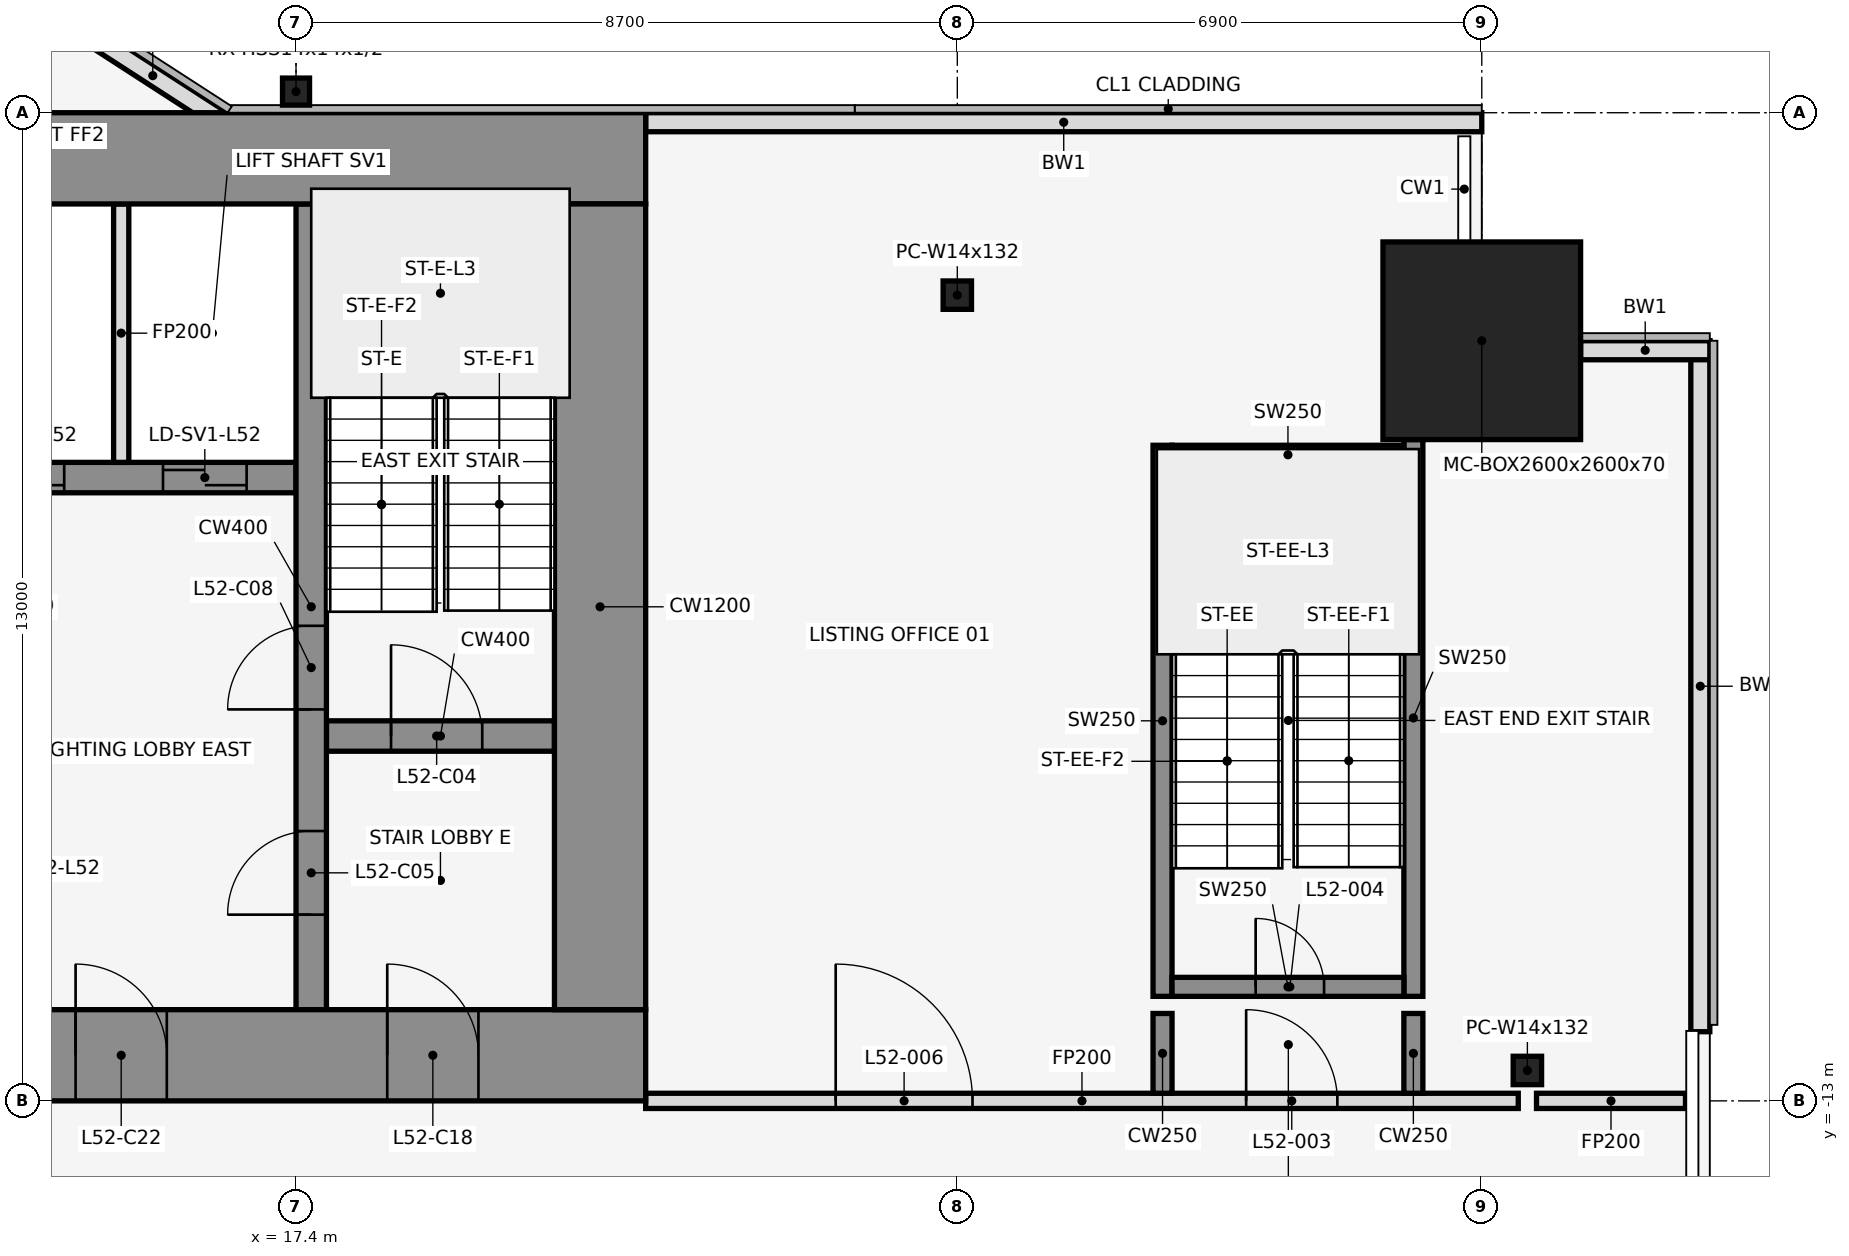
"""IFC4 building model, lengths in metres.
Left out: names, types, materials, properties, quantities, classifications, styles, units other than length and angle.
Written with IfcOpenShell. Run it as: python <this file> out.ifc"""

import sys

from ifc_helpers import new_model, si_unit, direction, frame, frame_2d, origin, origin_2d, place, context, subcontext, project, spatial, rectangle, hollow_rectangle, i_section, extrude, element, fill, save


model = new_model("IFC4")
c1 = context("Model", 3, precision=1e-05, world=origin(), true_north=direction((0.0, 1.0)))
c2 = subcontext(c1, "Body", "Model", "MODEL_VIEW")
j1 = project(units=[si_unit("LENGTHUNIT", "METRE"), si_unit("PLANEANGLEUNIT", "RADIAN")], contexts=[c1])
p1 = place(None, origin())
s1 = spatial("IfcSite", under=j1, at=p1, CompositionType="ELEMENT")
p2 = place(p1, origin())
s2 = spatial("IfcBuilding", under=s1, at=p2, CompositionType="ELEMENT")
p3 = place(p2, frame((0.0, 0.0, 231.9)))
s3 = spatial("IfcBuildingStorey", under=s2, at=p3, CompositionType="ELEMENT", Elevation=231.9)
p4 = place(p3, frame((26.1, -2.4, 0.0), z_axis=(0.0, 0.0, 1.0), x_axis=(1.0, 0.0, 0.0)))
e1 = element("IfcColumn", 1, at=p4, inside=s3, PredefinedType="COLUMN", context=c2, shape_type="SweptSolid", body=[
    extrude(i_section(OverallWidth=0.373, OverallDepth=0.373, WebThickness=0.016, FlangeThickness=0.026, at=origin_2d()), origin(), (0.0, 0.0, 1.0), 4.1),
])
p5 = place(p3, frame((33.0, -3.0, 0.0), z_axis=(0.0, 0.0, 1.0), x_axis=(1.0, 0.0, 0.0)))
e2 = element("IfcColumn", 2, at=p5, inside=s3, PredefinedType="COLUMN", context=c2, shape_type="SweptSolid", body=[
    extrude(hollow_rectangle(XDim=2.6, YDim=2.6, WallThickness=0.07, at=origin_2d()), origin(), (0.0, 0.0, 1.0), 4.1),
])
p6 = place(p3, frame((17.4, 0.278, 0.0), z_axis=(0.0, 0.0, 1.0), x_axis=(1.0, 0.0, 0.0)))
e3 = element("IfcColumn", 3, at=p6, inside=s3, PredefinedType="COLUMN", context=c2, shape_type="SweptSolid", body=[
    extrude(hollow_rectangle(XDim=0.356, YDim=0.356, WallThickness=0.012, at=origin_2d()), origin(), (0.0, 0.0, 1.0), 4.1),
])
p7 = place(p3, frame((33.6, -12.6, 0.0), z_axis=(0.0, 0.0, 1.0), x_axis=(1.0, 0.0, 0.0)))
e4 = element("IfcColumn", 4, at=p7, inside=s3, PredefinedType="COLUMN", context=c2, shape_type="SweptSolid", body=[
    extrude(i_section(OverallWidth=0.373, OverallDepth=0.373, WebThickness=0.016, FlangeThickness=0.026, at=origin_2d()), origin(), (0.0, 0.0, 1.0), 4.1),
])
p8 = place(p3, frame((33.0, -0.125, 0.0), z_axis=(0.0, 0.0, 1.0), x_axis=(-1.0, 0.0, 0.0)))
e5 = element("IfcWall", 5, at=p8, inside=s3, PredefinedType="STANDARD", context=c2, shape_type="SweptSolid", body=[
    extrude(rectangle(XDim=11.0, YDim=0.25, at=frame_2d((5.5, 0.0))), origin(), (0.0, 0.0, 1.0), 3.9),
])
p9 = place(p3, frame((16.432, -0.105, 0.0), z_axis=(0.0, 0.0, 1.0), x_axis=(-0.83981312244, 0.542875602121, 0.0)))
e6 = element("IfcWall", 6, at=p9, inside=s3, PredefinedType="STANDARD", context=c2, shape_type="SweptSolid", body=[
    extrude(rectangle(XDim=2.183, YDim=0.25, at=frame_2d((1.091, 0.0))), origin(), (0.0, 0.0, 1.0), 3.9),
])
p10 = place(p3, frame((35.875, -12.09, 0.0), z_axis=(0.0, 0.0, 1.0), x_axis=(0.0, 1.0, 0.0)))
e7 = element("IfcWall", 7, at=p10, inside=s3, PredefinedType="STANDARD", context=c2, shape_type="SweptSolid", body=[
    extrude(rectangle(XDim=9.09, YDim=0.25, at=frame_2d((4.545, 0.0))), origin(), (0.0, 0.0, 1.0), 3.9),
])
p11 = place(p3, frame((36.0, -3.125, 0.0), z_axis=(0.0, 0.0, 1.0), x_axis=(-1.0, 0.0, 0.0)))
e8 = element("IfcWall", 8, at=p11, inside=s3, PredefinedType="STANDARD", context=c2, shape_type="SweptSolid", body=[
    extrude(rectangle(XDim=1.7, YDim=0.25, at=frame_2d((0.85, 0.0))), origin(), (0.0, 0.0, 1.0), 3.9),
])
p12 = place(p3, frame((28.8, -11.625, 0.0), z_axis=(0.0, 0.0, 1.0), x_axis=(0.0, 1.0, 0.0)))
e9 = element("IfcWall", 9, at=p12, inside=s3, PredefinedType="SHEAR", context=c2, shape_type="SweptSolid", body=[
    extrude(rectangle(XDim=7.25, YDim=0.25, at=frame_2d((3.625, 0.0))), origin(), (0.0, 0.0, 1.0), 4.1),
])
p13 = place(p3, frame((32.1, -11.625, 0.0), z_axis=(0.0, 0.0, 1.0), x_axis=(0.0, 1.0, 0.0)))
e10 = element("IfcWall", 10, at=p13, inside=s3, PredefinedType="SHEAR", context=c2, shape_type="SweptSolid", body=[
    extrude(rectangle(XDim=7.325, YDim=0.25, at=frame_2d((3.663, 0.0))), origin(), (0.0, 0.0, 1.0), 4.1),
])
p14 = place(p3, frame((28.925, -11.5, 0.0), z_axis=(0.0, 0.0, 1.0), x_axis=(1.0, 0.0, 0.0)))
e11 = element("IfcWall", 11, at=p14, inside=s3, PredefinedType="SHEAR", context=c2, shape_type="SweptSolid", body=[
    extrude(rectangle(XDim=3.05, YDim=0.25, at=frame_2d((1.525, 0.0))), origin(), (0.0, 0.0, 1.0), 4.1),
])
p15 = place(p14, frame((1.1, 0.0, 0.0)))
e12 = element("IfcOpeningElement", 12, at=p15, cuts=e11, PredefinedType="OPENING", context=c2, shape_type="SweptSolid", body=[
    extrude(rectangle(XDim=0.9, YDim=2.1, at=frame_2d((0.45, 1.05))), frame((0.0, 0.137, 0.0), z_axis=(0.0, -1.0, 0.0), x_axis=(1.0, 0.0, 0.0)), (0.0, 0.0, 1.0), 0.274),
])
p16 = place(p3, frame((28.925, -4.5, 0.0), z_axis=(0.0, 0.0, 1.0), x_axis=(1.0, 0.0, 0.0)))
e13 = element("IfcWall", 13, at=p16, inside=s3, PredefinedType="SHEAR", context=c2, shape_type="SweptSolid", body=[
    extrude(rectangle(XDim=3.05, YDim=0.25, at=frame_2d((1.525, 0.0))), origin(), (0.0, 0.0, 1.0), 4.1),
])
p17 = place(p3, frame((22.0, -13.0, 0.0), z_axis=(0.0, 0.0, 1.0), x_axis=(1.0, 0.0, 0.0)))
e14 = element("IfcWall", 14, at=p17, inside=s3, PredefinedType="PARTITIONING", context=c2, shape_type="SweptSolid", body=[
    extrude(rectangle(XDim=11.48, YDim=0.2, at=frame_2d((5.74, 0.0))), origin(), (0.0, 0.0, 1.0), 2.79),
])
p18 = place(p17, frame((7.9, 0.0, 0.0)))
e15 = element("IfcOpeningElement", 15, at=p18, cuts=e14, PredefinedType="OPENING", context=c2, shape_type="SweptSolid", body=[
    extrude(rectangle(XDim=1.2, YDim=2.1, at=frame_2d((0.6, 1.05))), frame((0.0, 0.112, 0.0), z_axis=(0.0, -1.0, 0.0), x_axis=(1.0, 0.0, 0.0)), (0.0, 0.0, 1.0), 0.224),
])
p19 = place(p17, frame((2.5, 0.0, 0.0)))
e16 = element("IfcOpeningElement", 16, at=p19, cuts=e14, PredefinedType="OPENING", context=c2, shape_type="SweptSolid", body=[
    extrude(rectangle(XDim=1.8, YDim=2.1, at=frame_2d((0.9, 1.05))), frame((0.0, 0.112, 0.0), z_axis=(0.0, -1.0, 0.0), x_axis=(1.0, 0.0, 0.0)), (0.0, 0.0, 1.0), 0.224),
])
p20 = place(p3, frame((33.72, -13.0, 0.0), z_axis=(0.0, 0.0, 1.0), x_axis=(1.0, 0.0, 0.0)))
e17 = element("IfcWall", 17, at=p20, inside=s3, PredefinedType="PARTITIONING", context=c2, shape_type="SweptSolid", body=[
    extrude(rectangle(XDim=1.96, YDim=0.2, at=frame_2d((0.98, 0.0))), origin(), (0.0, 0.0, 1.0), 2.79),
])
for number, where, z_axis, x_axis in (
    (18, (28.8, -12.9, 0.0), (0.0, 0.0, 1.0), (0.0, 1.0, 0.0)),
    (19, (32.1, -12.9, 0.0), (0.0, 0.0, 1.0), (0.0, 1.0, 0.0)),
):
    element("IfcWall", number, at=place(p3, frame(where, z_axis=z_axis, x_axis=x_axis)), inside=s3, PredefinedType="SHEAR", context=c2, shape_type="SweptSolid", body=[
        extrude(rectangle(XDim=1.05, YDim=0.25, at=frame_2d((0.525, 0.0))), origin(), (0.0, 0.0, 1.0), 4.1),
    ])
p21 = place(p3, frame((17.8, -8.2, 0.0), z_axis=(0.0, 0.0, 1.0), x_axis=(1.0, 0.0, 0.0)))
e20 = element("IfcWall", 20, at=p21, inside=s3, PredefinedType="SHEAR", context=c2, shape_type="SweptSolid", body=[
    extrude(rectangle(XDim=3.0, YDim=0.4, at=frame_2d((1.5, 0.0))), origin(), (0.0, 0.0, 1.0), 4.1),
])
p22 = place(p21, frame((0.85, 0.0, 0.0)))
e21 = element("IfcOpeningElement", 21, at=p22, cuts=e20, PredefinedType="OPENING", context=c2, shape_type="SweptSolid", body=[
    extrude(rectangle(XDim=1.2, YDim=2.1, at=frame_2d((0.6, 1.05))), frame((0.0, 0.212, 0.0), z_axis=(0.0, -1.0, 0.0), x_axis=(1.0, 0.0, 0.0)), (0.0, 0.0, 1.0), 0.424),
])
p23 = place(p3, frame((3.8, -4.8, 0.0), z_axis=(0.0, 0.0, 1.0), x_axis=(1.0, 0.0, 0.0)))
e22 = element("IfcWall", 22, at=p23, inside=s3, PredefinedType="SHEAR", context=c2, shape_type="SweptSolid", body=[
    extrude(rectangle(XDim=13.6, YDim=0.4, at=frame_2d((6.8, 0.0))), origin(), (0.0, 0.0, 1.0), 4.1),
])
p24 = place(p23, frame((9.45, 0.0, 0.0)))
e23 = element("IfcOpeningElement", 23, at=p24, cuts=e22, PredefinedType="OPENING", context=c2, shape_type="SweptSolid", body=[
    extrude(rectangle(XDim=1.1, YDim=2.1, at=frame_2d((0.55, 1.05))), frame((0.0, 0.212, 0.0), z_axis=(0.0, -1.0, 0.0), x_axis=(1.0, 0.0, 0.0)), (0.0, 0.0, 1.0), 0.424),
])
p25 = place(p23, frame((11.85, 0.0, 0.0)))
e24 = element("IfcOpeningElement", 24, at=p25, cuts=e22, PredefinedType="OPENING", context=c2, shape_type="SweptSolid", body=[
    extrude(rectangle(XDim=1.1, YDim=2.1, at=frame_2d((0.55, 1.05))), frame((0.0, 0.212, 0.0), z_axis=(0.0, -1.0, 0.0), x_axis=(1.0, 0.0, 0.0)), (0.0, 0.0, 1.0), 0.424),
])
p26 = place(p3, frame((15.1, -4.6, 0.0), z_axis=(0.0, 0.0, 1.0), x_axis=(0.0, 1.0, 0.0)))
e25 = element("IfcWall", 25, at=p26, inside=s3, PredefinedType="PARTITIONING", context=c2, shape_type="SweptSolid", body=[
    extrude(rectangle(XDim=3.4, YDim=0.2, at=frame_2d((1.7, 0.0))), origin(), (0.0, 0.0, 1.0), 2.79),
])
p27 = place(p3, frame((17.6, -11.8, 0.0), z_axis=(0.0, 0.0, 1.0), x_axis=(0.0, 1.0, 0.0)))
e26 = element("IfcWall", 26, at=p27, inside=s3, PredefinedType="SHEAR", context=c2, shape_type="SweptSolid", body=[
    extrude(rectangle(XDim=10.6, YDim=0.4, at=frame_2d((5.3, 0.0))), origin(), (0.0, 0.0, 1.0), 4.1),
])
p28 = place(p27, frame((1.25, 0.0, 0.0)))
e27 = element("IfcOpeningElement", 27, at=p28, cuts=e26, PredefinedType="OPENING", context=c2, shape_type="SweptSolid", body=[
    extrude(rectangle(XDim=1.1, YDim=2.1, at=frame_2d((0.55, 1.05))), frame((0.0, 0.212, 0.0), z_axis=(0.0, -1.0, 0.0), x_axis=(1.0, 0.0, 0.0)), (0.0, 0.0, 1.0), 0.424),
])
p29 = place(p27, frame((3.95, 0.0, 0.0)))
e28 = element("IfcOpeningElement", 28, at=p29, cuts=e26, PredefinedType="OPENING", context=c2, shape_type="SweptSolid", body=[
    extrude(rectangle(XDim=1.1, YDim=2.1, at=frame_2d((0.55, 1.05))), frame((0.0, 0.212, 0.0), z_axis=(0.0, -1.0, 0.0), x_axis=(1.0, 0.0, 0.0)), (0.0, 0.0, 1.0), 0.424),
])
p30 = place(p3, frame((-22.0, -0.6, 0.0), z_axis=(0.0, 0.0, 1.0), x_axis=(1.0, 0.0, 0.0)))
e29 = element("IfcWall", 29, at=p30, inside=s3, PredefinedType="SHEAR", context=c2, shape_type="SweptSolid", body=[
    extrude(rectangle(XDim=44.0, YDim=1.2, at=frame_2d((22.0, 0.0))), origin(), (0.0, 0.0, 1.0), 4.1),
])
p31 = place(p30, frame((18.55, 0.0, 0.0)))
e30 = element("IfcOpeningElement", 30, at=p31, cuts=e29, PredefinedType="OPENING", context=c2, shape_type="SweptSolid", body=[
    extrude(rectangle(XDim=0.9, YDim=2.1, at=frame_2d((0.45, 1.05))), frame((0.0, 0.612, 0.0), z_axis=(0.0, -1.0, 0.0), x_axis=(1.0, 0.0, 0.0)), (0.0, 0.0, 1.0), 1.224),
])
p32 = place(p30, frame((24.55, 0.0, 0.0)))
e31 = element("IfcOpeningElement", 31, at=p32, cuts=e29, PredefinedType="OPENING", context=c2, shape_type="SweptSolid", body=[
    extrude(rectangle(XDim=0.9, YDim=2.1, at=frame_2d((0.45, 1.05))), frame((0.0, 0.612, 0.0), z_axis=(0.0, -1.0, 0.0), x_axis=(1.0, 0.0, 0.0)), (0.0, 0.0, 1.0), 1.224),
])
p33 = place(p3, frame((-22.0, -12.4, 0.0), z_axis=(0.0, 0.0, 1.0), x_axis=(1.0, 0.0, 0.0)))
e32 = element("IfcWall", 32, at=p33, inside=s3, PredefinedType="SHEAR", context=c2, shape_type="SweptSolid", body=[
    extrude(rectangle(XDim=44.0, YDim=1.2, at=frame_2d((22.0, 0.0))), origin(), (0.0, 0.0, 1.0), 4.1),
])
p34 = place(p33, frame((2.2, 0.0, 0.0)))
e33 = element("IfcOpeningElement", 33, at=p34, cuts=e32, PredefinedType="OPENING", context=c2, shape_type="SweptSolid", body=[
    extrude(rectangle(XDim=1.2, YDim=2.1, at=frame_2d((0.6, 1.05))), frame((0.0, 0.612, 0.0), z_axis=(0.0, -1.0, 0.0), x_axis=(1.0, 0.0, 0.0)), (0.0, 0.0, 1.0), 1.224),
])
p35 = place(p33, frame((21.4, 0.0, 0.0)))
e34 = element("IfcOpeningElement", 34, at=p35, cuts=e32, PredefinedType="OPENING", context=c2, shape_type="SweptSolid", body=[
    extrude(rectangle(XDim=1.2, YDim=2.1, at=frame_2d((0.6, 1.05))), frame((0.0, 0.612, 0.0), z_axis=(0.0, -1.0, 0.0), x_axis=(1.0, 0.0, 0.0)), (0.0, 0.0, 1.0), 1.224),
])
p36 = place(p33, frame((40.6, 0.0, 0.0)))
e35 = element("IfcOpeningElement", 35, at=p36, cuts=e32, PredefinedType="OPENING", context=c2, shape_type="SweptSolid", body=[
    extrude(rectangle(XDim=1.2, YDim=2.1, at=frame_2d((0.6, 1.05))), frame((0.0, 0.612, 0.0), z_axis=(0.0, -1.0, 0.0), x_axis=(1.0, 0.0, 0.0)), (0.0, 0.0, 1.0), 1.224),
])
p37 = place(p33, frame((16.0, 0.0, 0.0)))
e36 = element("IfcOpeningElement", 36, at=p37, cuts=e32, PredefinedType="OPENING", context=c2, shape_type="SweptSolid", body=[
    extrude(rectangle(XDim=1.8, YDim=2.1, at=frame_2d((0.9, 1.05))), frame((0.0, 0.612, 0.0), z_axis=(0.0, -1.0, 0.0), x_axis=(1.0, 0.0, 0.0)), (0.0, 0.0, 1.0), 1.224),
])
p38 = place(p33, frame((6.3, 0.0, 0.0)))
e37 = element("IfcOpeningElement", 37, at=p38, cuts=e32, PredefinedType="OPENING", context=c2, shape_type="SweptSolid", body=[
    extrude(rectangle(XDim=1.2, YDim=2.1, at=frame_2d((0.6, 1.05))), frame((0.0, 0.612, 0.0), z_axis=(0.0, -1.0, 0.0), x_axis=(1.0, 0.0, 0.0)), (0.0, 0.0, 1.0), 1.224),
])
p39 = place(p33, frame((26.2, 0.0, 0.0)))
e38 = element("IfcOpeningElement", 38, at=p39, cuts=e32, PredefinedType="OPENING", context=c2, shape_type="SweptSolid", body=[
    extrude(rectangle(XDim=1.8, YDim=2.1, at=frame_2d((0.9, 1.05))), frame((0.0, 0.612, 0.0), z_axis=(0.0, -1.0, 0.0), x_axis=(1.0, 0.0, 0.0)), (0.0, 0.0, 1.0), 1.224),
])
p40 = place(p33, frame((36.5, 0.0, 0.0)))
e39 = element("IfcOpeningElement", 39, at=p40, cuts=e32, PredefinedType="OPENING", context=c2, shape_type="SweptSolid", body=[
    extrude(rectangle(XDim=1.2, YDim=2.1, at=frame_2d((0.6, 1.05))), frame((0.0, 0.612, 0.0), z_axis=(0.0, -1.0, 0.0), x_axis=(1.0, 0.0, 0.0)), (0.0, 0.0, 1.0), 1.224),
])
p41 = place(p3, frame((21.4, -11.8, 0.0), z_axis=(0.0, 0.0, 1.0), x_axis=(0.0, 1.0, 0.0)))
e40 = element("IfcWall", 40, at=p41, inside=s3, PredefinedType="SHEAR", context=c2, shape_type="SweptSolid", body=[
    extrude(rectangle(XDim=10.6, YDim=1.2, at=frame_2d((5.3, 0.0))), origin(), (0.0, 0.0, 1.0), 4.1),
])
p42 = place(p18, origin())
e41 = element("IfcDoor", 41, at=p42, inside=s3, OperationType="SINGLE_SWING_RIGHT", PredefinedType="DOOR", context=c2, shape_type="SweptSolid", body=[
    extrude(rectangle(XDim=1.2, YDim=2.1, at=frame_2d((0.6, 1.05))), frame((0.0, 0.025, 0.0), z_axis=(0.0, -1.0, 0.0), x_axis=(1.0, 0.0, 0.0)), (0.0, 0.0, 1.0), 0.05),
])
fill(e15, e41)
p43 = place(p15, origin())
e42 = element("IfcDoor", 42, at=p43, inside=s3, OperationType="SINGLE_SWING_LEFT", PredefinedType="DOOR", context=c2, shape_type="SweptSolid", body=[
    extrude(rectangle(XDim=0.9, YDim=2.1, at=frame_2d((0.45, 1.05))), frame((0.0, 0.025, 0.0), z_axis=(0.0, -1.0, 0.0), x_axis=(1.0, 0.0, 0.0)), (0.0, 0.0, 1.0), 0.05),
])
fill(e12, e42)
p44 = place(p19, origin())
e43 = element("IfcDoor", 43, at=p44, inside=s3, OperationType="SINGLE_SWING_LEFT", PredefinedType="DOOR", context=c2, shape_type="SweptSolid", body=[
    extrude(rectangle(XDim=1.8, YDim=2.1, at=frame_2d((0.9, 1.05))), frame((0.0, 0.025, 0.0), z_axis=(0.0, -1.0, 0.0), x_axis=(1.0, 0.0, 0.0)), (0.0, 0.0, 1.0), 0.05),
])
fill(e16, e43)
p45 = place(p22, origin())
e44 = element("IfcDoor", 44, at=p45, inside=s3, OperationType="SINGLE_SWING_RIGHT", PredefinedType="DOOR", context=c2, shape_type="SweptSolid", body=[
    extrude(rectangle(XDim=1.2, YDim=2.1, at=frame_2d((0.6, 1.05))), frame((0.0, 0.025, 0.0), z_axis=(0.0, -1.0, 0.0), x_axis=(1.0, 0.0, 0.0)), (0.0, 0.0, 1.0), 0.05),
])
fill(e21, e44)
p46 = place(p28, origin())
e45 = element("IfcDoor", 45, at=p46, inside=s3, OperationType="SINGLE_SWING_LEFT", PredefinedType="DOOR", context=c2, shape_type="SweptSolid", body=[
    extrude(rectangle(XDim=1.1, YDim=2.1, at=frame_2d((0.55, 1.05))), frame((0.0, 0.025, 0.0), z_axis=(0.0, -1.0, 0.0), x_axis=(1.0, 0.0, 0.0)), (0.0, 0.0, 1.0), 0.05),
])
fill(e27, e45)
p47 = place(p24, origin())
e46 = element("IfcDoor", 46, at=p47, inside=s3, OperationType="DOUBLE_DOOR_SLIDING", PredefinedType="DOOR", context=c2, shape_type="SweptSolid", body=[
    extrude(rectangle(XDim=1.1, YDim=2.1, at=frame_2d((0.55, 1.05))), frame((0.0, 0.025, 0.0), z_axis=(0.0, -1.0, 0.0), x_axis=(1.0, 0.0, 0.0)), (0.0, 0.0, 1.0), 0.05),
])
fill(e23, e46)
p48 = place(p25, origin())
e47 = element("IfcDoor", 47, at=p48, inside=s3, OperationType="DOUBLE_DOOR_SLIDING", PredefinedType="DOOR", context=c2, shape_type="SweptSolid", body=[
    extrude(rectangle(XDim=1.1, YDim=2.1, at=frame_2d((0.55, 1.05))), frame((0.0, 0.025, 0.0), z_axis=(0.0, -1.0, 0.0), x_axis=(1.0, 0.0, 0.0)), (0.0, 0.0, 1.0), 0.05),
])
fill(e24, e47)
p49 = place(p29, origin())
e48 = element("IfcDoor", 48, at=p49, inside=s3, OperationType="SINGLE_SWING_RIGHT", PredefinedType="DOOR", context=c2, shape_type="SweptSolid", body=[
    extrude(rectangle(XDim=1.1, YDim=2.1, at=frame_2d((0.55, 1.05))), frame((0.0, 0.025, 0.0), z_axis=(0.0, -1.0, 0.0), x_axis=(1.0, 0.0, 0.0)), (0.0, 0.0, 1.0), 0.05),
])
fill(e28, e48)
p50 = place(p36, frame((1.2, 0.0, 0.0), z_axis=(0.0, 0.0, 1.0), x_axis=(-1.0, 0.0, 0.0)))
e49 = element("IfcDoor", 49, at=p50, inside=s3, OperationType="SINGLE_SWING_RIGHT", PredefinedType="DOOR", context=c2, shape_type="SweptSolid", body=[
    extrude(rectangle(XDim=1.2, YDim=2.1, at=frame_2d((0.6, 1.05))), frame((0.0, 0.025, 0.0), z_axis=(0.0, -1.0, 0.0), x_axis=(1.0, 0.0, 0.0)), (0.0, 0.0, 1.0), 0.05),
])
fill(e35, e49)
p51 = place(p40, frame((1.2, 0.0, 0.0), z_axis=(0.0, 0.0, 1.0), x_axis=(-1.0, 0.0, 0.0)))
e50 = element("IfcDoor", 50, at=p51, inside=s3, OperationType="SINGLE_SWING_RIGHT", PredefinedType="DOOR", context=c2, shape_type="SweptSolid", body=[
    extrude(rectangle(XDim=1.2, YDim=2.1, at=frame_2d((0.6, 1.05))), frame((0.0, 0.025, 0.0), z_axis=(0.0, -1.0, 0.0), x_axis=(1.0, 0.0, 0.0)), (0.0, 0.0, 1.0), 0.05),
])
fill(e39, e50)
save(model, sys.argv[1])
